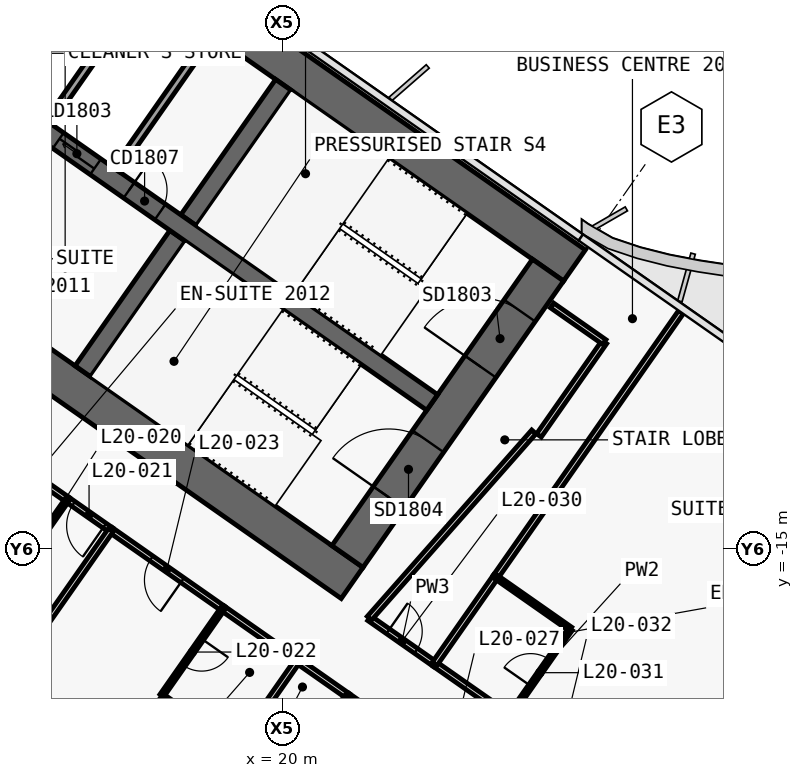
"""IFC4 building model, lengths in metres.
Left out: names, types, materials, properties, quantities, classifications, styles, units other than length and angle.
Written with IfcOpenShell. Run it as: python <this file> out.ifc"""

import sys

from ifc_helpers import new_model, si_unit, direction, frame, frame_2d, origin, place, context, subcontext, project, spatial, polyline, rectangle, outline, extrude, element, fill, save


model = new_model("IFC4")
c1 = context("Model", 3, precision=1e-05, world=origin(), true_north=direction((0.0, 1.0)))
c2 = subcontext(c1, "Body", "Model", "MODEL_VIEW")
j1 = project(units=[si_unit("LENGTHUNIT", "METRE"), si_unit("PLANEANGLEUNIT", "RADIAN")], contexts=[c1])
p1 = place(None, origin())
s1 = spatial("IfcSite", under=j1, at=p1, CompositionType="ELEMENT")
p2 = place(p1, origin())
s2 = spatial("IfcBuilding", under=s1, at=p2, CompositionType="ELEMENT")
p3 = place(p2, frame((0.0, 0.0, 97.7)))
s3 = spatial("IfcBuildingStorey", under=s2, at=p3, CompositionType="ELEMENT", Elevation=97.7)
p4 = place(p3, frame((-0.037, 11.867, 0.0), z_axis=(0.0, 0.0, 1.0), x_axis=(0.819155306259, -0.573571777746, 0.0)))
e1 = element("IfcWall", 1, at=p4, inside=s3, PredefinedType="SHEAR", context=c2, shape_type="SweptSolid", body=[
    extrude(outline(polyline([(33.837, 0.5), (0.0, 0.5), (0.7, -0.5), (33.837, -0.5), (33.837, 0.5)])), origin(), (0.0, 0.0, 1.0), 3.6),
])
p5 = place(p3, frame((-0.037, -0.585, 0.0), z_axis=(0.0, 0.0, 1.0), x_axis=(0.819157152511, -0.573569140985, 0.0)))
e2 = element("IfcWall", 2, at=p5, inside=s3, PredefinedType="SHEAR", context=c2, shape_type="SweptSolid", body=[
    extrude(outline(polyline([(26.695, 0.5), (0.0, 0.5), (0.7, -0.5), (26.695, -0.5), (26.695, 0.5)])), origin(), (0.0, 0.0, 1.0), 3.6),
])
p6 = place(p5, frame((1.245, 0.0, 0.0)))
e3 = element("IfcOpeningElement", 3, at=p6, cuts=e2, PredefinedType="OPENING", context=c2, shape_type="SweptSolid", body=[
    extrude(rectangle(XDim=1.5, YDim=2.1, at=frame_2d((0.75, 1.05))), frame((0.0, 0.51, 0.0), z_axis=(0.0, -1.0, 0.0), x_axis=(1.0, 0.0, 0.0)), (0.0, 0.0, 1.0), 1.02),
])
p7 = place(p5, frame((12.445, 0.0, 0.0)))
e4 = element("IfcOpeningElement", 4, at=p7, cuts=e2, PredefinedType="OPENING", context=c2, shape_type="SweptSolid", body=[
    extrude(rectangle(XDim=1.5, YDim=2.1, at=frame_2d((0.75, 1.05))), frame((0.0, 0.51, 0.0), z_axis=(0.0, -1.0, 0.0), x_axis=(1.0, 0.0, 0.0)), (0.0, 0.0, 1.0), 1.02),
])
p8 = place(p3, frame((21.708, -15.2, 0.0), z_axis=(0.0, 0.0, 1.0), x_axis=(0.573576324356, 0.819152122709, 0.0)))
e5 = element("IfcWall", 5, at=p8, inside=s3, PredefinedType="SHEAR", context=c2, shape_type="SweptSolid", body=[
    extrude(outline(polyline([(9.2, 0.5), (0.0, 0.5), (0.0, -0.5), (9.2, -0.5), (9.2, 0.5)])), origin(), (0.0, 0.0, 1.0), 3.6),
])
p9 = place(p8, frame((6.1, 0.0, 0.0)))
e6 = element("IfcOpeningElement", 6, at=p9, cuts=e5, PredefinedType="OPENING", context=c2, shape_type="SweptSolid", body=[
    extrude(rectangle(XDim=1.8, YDim=2.1, at=frame_2d((0.9, 1.05))), frame((0.0, 0.51, 0.0), z_axis=(0.0, -1.0, 0.0), x_axis=(1.0, 0.0, 0.0)), (0.0, 0.0, 1.0), 1.02),
])
p10 = place(p8, frame((1.9, 0.0, 0.0)))
e7 = element("IfcOpeningElement", 7, at=p10, cuts=e5, PredefinedType="OPENING", context=c2, shape_type="SweptSolid", body=[
    extrude(rectangle(XDim=1.8, YDim=2.1, at=frame_2d((0.9, 1.05))), frame((0.0, 0.51, 0.0), z_axis=(0.0, -1.0, 0.0), x_axis=(1.0, 0.0, 0.0)), (0.0, 0.0, 1.0), 1.02),
])
p11 = place(p3, frame((14.745, -10.324, 0.0), z_axis=(0.0, 0.0, 1.0), x_axis=(0.57356780395, 0.819158088694, 0.0)))
e8 = element("IfcWall", 8, at=p11, inside=s3, PredefinedType="SHEAR", context=c2, shape_type="SweptSolid", body=[
    extrude(outline(polyline([(0.0, 0.25), (0.0, -0.25), (4.35, -0.25), (4.35, 0.25), (0.0, 0.25)])), origin(), (0.0, 0.0, 1.0), 3.6),
])
p12 = place(p3, frame((17.527, -6.352, 0.0), z_axis=(0.0, 0.0, 1.0), x_axis=(0.573530143085, 0.819184457233, 0.0)))
e9 = element("IfcWall", 9, at=p12, inside=s3, PredefinedType="SHEAR", context=c2, shape_type="SweptSolid", body=[
    extrude(outline(polyline([(4.35, -0.25), (4.35, 0.25), (0.0, 0.25), (0.0, -0.25), (4.35, -0.25)])), origin(), (0.0, 0.0, 1.0), 3.6),
])
p13 = place(p3, frame((2.638, 3.768, 0.0), z_axis=(0.0, 0.0, 1.0), x_axis=(0.819148977158, -0.573580816643, 0.0)))
e10 = element("IfcWall", 10, at=p13, inside=s3, PredefinedType="SHEAR", context=c2, shape_type="SweptSolid", body=[
    extrude(outline(polyline([(0.0, 0.25), (0.0, -0.25), (26.0, -0.25), (26.0, 0.25), (0.0, 0.25)])), origin(), (0.0, 0.0, 1.0), 3.6),
])
p14 = place(p13, frame((9.637, 0.0, 0.0)))
e11 = element("IfcOpeningElement", 11, at=p14, cuts=e10, PredefinedType="OPENING", context=c2, shape_type="SweptSolid", body=[
    extrude(rectangle(XDim=1.2, YDim=2.1, at=frame_2d((0.6, 1.05))), frame((0.0, 0.26, 0.0), z_axis=(0.0, -1.0, 0.0), x_axis=(1.0, 0.0, 0.0)), (0.0, 0.0, 1.0), 0.52),
])
p15 = place(p13, frame((11.812, 0.0, 0.0)))
e12 = element("IfcOpeningElement", 12, at=p15, cuts=e10, PredefinedType="OPENING", context=c2, shape_type="SweptSolid", body=[
    extrude(rectangle(XDim=1.2, YDim=2.1, at=frame_2d((0.6, 1.05))), frame((0.0, 0.26, 0.0), z_axis=(0.0, -1.0, 0.0), x_axis=(1.0, 0.0, 0.0)), (0.0, 0.0, 1.0), 0.52),
])
p16 = place(p13, frame((13.988, 0.0, 0.0)))
e13 = element("IfcOpeningElement", 13, at=p16, cuts=e10, PredefinedType="OPENING", context=c2, shape_type="SweptSolid", body=[
    extrude(rectangle(XDim=1.2, YDim=2.1, at=frame_2d((0.6, 1.05))), frame((0.0, 0.26, 0.0), z_axis=(0.0, -1.0, 0.0), x_axis=(1.0, 0.0, 0.0)), (0.0, 0.0, 1.0), 0.52),
])
p17 = place(p13, frame((16.262, 0.0, 0.0)))
e14 = element("IfcOpeningElement", 14, at=p17, cuts=e10, PredefinedType="OPENING", context=c2, shape_type="SweptSolid", body=[
    extrude(rectangle(XDim=1.0, YDim=2.1, at=frame_2d((0.5, 1.05))), frame((0.0, 0.26, 0.0), z_axis=(0.0, -1.0, 0.0), x_axis=(1.0, 0.0, 0.0)), (0.0, 0.0, 1.0), 0.52),
])
p18 = place(p3, frame((12.059, -2.523, 0.0), z_axis=(0.0, 0.0, 1.0), x_axis=(0.573594173421, 0.819139624372, 0.0)))
e15 = element("IfcWall", 15, at=p18, inside=s3, PredefinedType="SOLIDWALL", context=c2, shape_type="SweptSolid", body=[
    extrude(rectangle(XDim=4.35, YDim=0.2, at=frame_2d((2.175, 0.0))), origin(), (0.0, 0.0, 1.0), 3.6),
])
p19 = place(p3, frame((13.84, -3.771, 0.0), z_axis=(0.0, 0.0, 1.0), x_axis=(0.57356780395, 0.819158088694, 0.0)))
e16 = element("IfcWall", 16, at=p19, inside=s3, PredefinedType="SOLIDWALL", context=c2, shape_type="SweptSolid", body=[
    extrude(rectangle(XDim=4.35, YDim=0.2, at=frame_2d((2.175, 0.0))), origin(), (0.0, 0.0, 1.0), 3.6),
])
p20 = place(p3, frame((15.622, -5.018, 0.0), z_axis=(0.0, 0.0, 1.0), x_axis=(0.573594173421, 0.819139624372, 0.0)))
e17 = element("IfcWall", 17, at=p20, inside=s3, PredefinedType="SOLIDWALL", context=c2, shape_type="SweptSolid", body=[
    extrude(rectangle(XDim=4.35, YDim=0.2, at=frame_2d((2.175, 0.0))), origin(), (0.0, 0.0, 1.0), 3.6),
])
p21 = place(p3, frame((22.284, -16.824, 0.0), z_axis=(0.0, 0.0, 1.0), x_axis=(0.819160859995, -0.573563846013, 0.0)))
e18 = element("IfcWall", 18, at=p21, inside=s3, PredefinedType="PARTITIONING", context=c2, shape_type="SweptSolid", body=[
    extrude(rectangle(XDim=2.098, YDim=0.15, at=frame_2d((1.049, 0.0))), origin(), (0.0, 0.0, 1.0), 3.32),
])
p22 = place(p21, frame((0.599, 0.0, 0.0)))
e19 = element("IfcOpeningElement", 19, at=p22, cuts=e18, PredefinedType="OPENING", context=c2, shape_type="SweptSolid", body=[
    extrude(rectangle(XDim=0.9, YDim=2.1, at=frame_2d((0.45, 1.05))), frame((0.0, 0.085, 0.0), z_axis=(0.0, -1.0, 0.0), x_axis=(1.0, 0.0, 0.0)), (0.0, 0.0, 1.0), 0.17),
])
p23 = place(p3, frame((23.999, -18.025, 0.0), z_axis=(0.0, 0.0, 1.0), x_axis=(0.819146032251, -0.573585022335, 0.0)))
e20 = element("IfcWall", 20, at=p23, inside=s3, PredefinedType="PARTITIONING", context=c2, shape_type="SweptSolid", body=[
    extrude(rectangle(XDim=2.404, YDim=0.15, at=frame_2d((1.202, 0.0))), origin(), (0.0, 0.0, 1.0), 3.32),
])
p24 = place(p3, frame((15.483, -14.504, 0.0), z_axis=(0.0, 0.0, 1.0), x_axis=(-0.819199220913, 0.573509055252, 0.0)))
e21 = element("IfcWall", 21, at=p24, inside=s3, PredefinedType="PARTITIONING", context=c2, shape_type="SweptSolid", body=[
    extrude(rectangle(XDim=1.403, YDim=0.15, at=frame_2d((0.702, 0.0))), origin(), (0.0, 0.0, 1.0), 3.32),
])
p25 = place(p24, frame((0.202, 0.0, 0.0)))
e22 = element("IfcOpeningElement", 22, at=p25, cuts=e21, PredefinedType="OPENING", context=c2, shape_type="SweptSolid", body=[
    extrude(rectangle(XDim=1.0, YDim=2.1, at=frame_2d((0.5, 1.05))), frame((0.0, 0.085, 0.0), z_axis=(0.0, -1.0, 0.0), x_axis=(1.0, 0.0, 0.0)), (0.0, 0.0, 1.0), 0.17),
])
p26 = place(p3, frame((14.336, -13.701, 0.0), z_axis=(0.0, 0.0, 1.0), x_axis=(-0.819138938282, 0.573595153214, 0.0)))
e23 = element("IfcWall", 23, at=p26, inside=s3, PredefinedType="PARTITIONING", context=c2, shape_type="SweptSolid", body=[
    extrude(rectangle(XDim=1.604, YDim=0.15, at=frame_2d((0.802, 0.0))), origin(), (0.0, 0.0, 1.0), 2.6),
])
p27 = place(p3, frame((18.431, -16.568, 0.0), z_axis=(0.0, 0.0, 1.0), x_axis=(-0.819145961204, 0.573585123798, 0.0)))
e24 = element("IfcWall", 24, at=p27, inside=s3, PredefinedType="PARTITIONING", context=c2, shape_type="SweptSolid", body=[
    extrude(rectangle(XDim=3.603, YDim=0.15, at=frame_2d((1.802, 0.0))), origin(), (0.0, 0.0, 1.0), 3.32),
])
p28 = place(p27, frame((1.301, 0.0, 0.0)))
e25 = element("IfcOpeningElement", 25, at=p28, cuts=e24, PredefinedType="OPENING", context=c2, shape_type="SweptSolid", body=[
    extrude(rectangle(XDim=1.0, YDim=2.1, at=frame_2d((0.5, 1.05))), frame((0.0, 0.085, 0.0), z_axis=(0.0, -1.0, 0.0), x_axis=(1.0, 0.0, 0.0)), (0.0, 0.0, 1.0), 0.17),
])
p29 = place(p3, frame((20.398, -17.945, 0.0), z_axis=(0.0, 0.0, 1.0), x_axis=(-0.819146032251, 0.573585022335, 0.0)))
e26 = element("IfcWall", 26, at=p29, inside=s3, PredefinedType="PARTITIONING", context=c2, shape_type="SweptSolid", body=[
    extrude(rectangle(XDim=2.404, YDim=0.15, at=frame_2d((1.202, 0.0))), origin(), (0.0, 0.0, 1.0), 2.6),
])
p30 = place(p3, frame((22.855, -19.666, 0.0), z_axis=(0.0, 0.0, 1.0), x_axis=(-0.819060210533, 0.573707566205, 0.0)))
e27 = element("IfcWall", 27, at=p30, inside=s3, PredefinedType="PARTITIONING", context=c2, shape_type="SweptSolid", body=[
    extrude(rectangle(XDim=1.403, YDim=0.15, at=frame_2d((0.702, 0.0))), origin(), (0.0, 0.0, 1.0), 3.32),
])
p31 = place(p30, frame((0.202, 0.0, 0.0)))
e28 = element("IfcOpeningElement", 28, at=p31, cuts=e27, PredefinedType="OPENING", context=c2, shape_type="SweptSolid", body=[
    extrude(rectangle(XDim=1.0, YDim=2.1, at=frame_2d((0.5, 1.05))), frame((0.0, 0.085, 0.0), z_axis=(0.0, -1.0, 0.0), x_axis=(1.0, 0.0, 0.0)), (0.0, 0.0, 1.0), 0.17),
])
p32 = place(p3, frame((21.709, -18.863, 0.0), z_axis=(0.0, 0.0, 1.0), x_axis=(-0.819189013667, 0.573523634986, 0.0)))
e29 = element("IfcWall", 29, at=p32, inside=s3, PredefinedType="PARTITIONING", context=c2, shape_type="SweptSolid", body=[
    extrude(rectangle(XDim=1.604, YDim=0.15, at=frame_2d((0.802, 0.0))), origin(), (0.0, 0.0, 1.0), 2.6),
])
p33 = place(p3, frame((30.482, -8.77, 0.0), z_axis=(0.0, 0.0, 1.0), x_axis=(-0.573576058406, -0.819152308929, 0.0)))
e30 = element("IfcWall", 30, at=p33, inside=s3, PredefinedType="PARTITIONING", context=c2, shape_type="SweptSolid", body=[
    extrude(rectangle(XDim=8.501, YDim=0.15, at=frame_2d((4.25, 0.0))), origin(), (0.0, 0.0, 1.0), 2.6),
])
p34 = place(p3, frame((25.608, -15.731, 0.0), z_axis=(0.0, 0.0, 1.0), x_axis=(-0.573596837309, -0.819137759006, 0.0)))
e31 = element("IfcWall", 31, at=p34, inside=s3, PredefinedType="PARTITIONING", context=c2, shape_type="SweptSolid", body=[
    extrude(rectangle(XDim=2.802, YDim=0.15, at=frame_2d((1.401, 0.0))), origin(), (0.0, 0.0, 1.0), 2.6),
])
p35 = place(p3, frame((22.285, -16.825, 0.0), z_axis=(0.0, 0.0, 1.0), x_axis=(0.661551268245, 0.749899939647, 0.0)))
e32 = element("IfcWall", 32, at=p35, inside=s3, PredefinedType="PARTITIONING", context=c2, shape_type="SweptSolid", body=[
    extrude(rectangle(XDim=6.541, YDim=0.15, at=frame_2d((3.271, 0.0))), origin(), (0.0, 0.0, 1.0), 2.6),
])
p36 = place(p3, frame((26.746, -12.014, 0.0), z_axis=(0.0, 0.0, 1.0), x_axis=(0.573560650686, 0.819163097304, 0.0)))
e33 = element("IfcWall", 33, at=p36, inside=s3, PredefinedType="PARTITIONING", context=c2, shape_type="SweptSolid", body=[
    extrude(rectangle(XDim=3.0, YDim=0.15, at=frame_2d((1.5, 0.0))), origin(), (0.0, 0.0, 1.0), 3.32),
])
p37 = place(p3, frame((28.467, -9.556, 0.0), z_axis=(0.0, 0.0, 1.0), x_axis=(-0.819109000826, 0.573637903879, 0.0)))
e34 = element("IfcWall", 34, at=p37, inside=s3, PredefinedType="PARTITIONING", context=c2, shape_type="SweptSolid", body=[
    extrude(rectangle(XDim=1.68, YDim=0.15, at=frame_2d((0.84, 0.0))), origin(), (0.0, 0.0, 1.0), 3.32),
])
p38 = place(p3, frame((25.968, -19.404, 0.0), z_axis=(0.0, 0.0, 1.0), x_axis=(0.573591086599, 0.819141785879, 0.0)))
e35 = element("IfcWall", 35, at=p38, inside=s3, PredefinedType="PARTITIONING", context=c2, shape_type="SweptSolid", body=[
    extrude(rectangle(XDim=2.8, YDim=0.12, at=frame_2d((1.4, 0.0))), origin(), (0.0, 0.0, 1.0), 2.6),
])
p39 = place(p38, frame((0.975, 0.0, 0.0)))
e36 = element("IfcOpeningElement", 36, at=p39, cuts=e35, PredefinedType="OPENING", context=c2, shape_type="SweptSolid", body=[
    extrude(rectangle(XDim=0.85, YDim=2.05, at=frame_2d((0.425, 1.025))), frame((0.0, 0.07, 0.0), z_axis=(0.0, -1.0, 0.0), x_axis=(1.0, 0.0, 0.0)), (0.0, 0.0, 1.0), 0.14),
])
p40 = place(p3, frame((27.573, -17.109, 0.0), z_axis=(0.0, 0.0, 1.0), x_axis=(-0.819107643868, 0.573639841501, 0.0)))
e37 = element("IfcWall", 37, at=p40, inside=s3, PredefinedType="PARTITIONING", context=c2, shape_type="SweptSolid", body=[
    extrude(rectangle(XDim=2.4, YDim=0.12, at=frame_2d((1.2, 0.0))), origin(), (0.0, 0.0, 1.0), 3.32),
])
p41 = place(p3, frame((37.855, -13.932, 0.0), z_axis=(0.0, 0.0, 1.0), x_axis=(-0.573571089604, -0.819155788095, 0.0)))
e38 = element("IfcWall", 38, at=p41, inside=s3, PredefinedType="PARTITIONING", context=c2, shape_type="SweptSolid", body=[
    extrude(rectangle(XDim=11.3, YDim=0.15, at=frame_2d((5.65, 0.0))), origin(), (0.0, 0.0, 1.0), 2.5),
])
p42 = place(p3, frame((12.844, -15.83, 0.0), z_axis=(0.0, 0.0, 1.0), x_axis=(0.573582085028, 0.819148089014, 0.0)))
e39 = element("IfcWall", 39, at=p42, inside=s3, PredefinedType="PARTITIONING", context=c2, shape_type="SweptSolid", body=[
    extrude(rectangle(XDim=2.6, YDim=0.12, at=frame_2d((1.3, 0.0))), origin(), (0.0, 0.0, 1.0), 3.32),
])
p43 = place(p42, frame((0.875, 0.0, 0.0)))
e40 = element("IfcOpeningElement", 40, at=p43, cuts=e39, PredefinedType="OPENING", context=c2, shape_type="SweptSolid", body=[
    extrude(rectangle(XDim=0.85, YDim=2.05, at=frame_2d((0.425, 1.025))), frame((0.0, 0.07, 0.0), z_axis=(0.0, -1.0, 0.0), x_axis=(1.0, 0.0, 0.0)), (0.0, 0.0, 1.0), 0.14),
])
p44 = place(p3, frame((15.481, -14.503, 0.0), z_axis=(0.0, 0.0, 1.0), x_axis=(-0.573572324301, -0.819154923562, 0.0)))
e41 = element("IfcWall", 41, at=p44, inside=s3, PredefinedType="PARTITIONING", context=c2, shape_type="SweptSolid", body=[
    extrude(rectangle(XDim=7.3, YDim=0.15, at=frame_2d((3.65, 0.0))), origin(), (0.0, 0.0, 1.0), 2.5),
])
p45 = place(p3, frame((18.43, -16.567, 0.0), z_axis=(0.0, 0.0, 1.0), x_axis=(-0.573608623498, -0.819129505664, 0.0)))
e42 = element("IfcWall", 42, at=p45, inside=s3, PredefinedType="PARTITIONING", context=c2, shape_type="SweptSolid", body=[
    extrude(rectangle(XDim=2.8, YDim=0.12, at=frame_2d((1.4, 0.0))), origin(), (0.0, 0.0, 1.0), 3.32),
])
p46 = place(p45, frame((0.975, 0.0, 0.0)))
e43 = element("IfcOpeningElement", 43, at=p46, cuts=e42, PredefinedType="OPENING", context=c2, shape_type="SweptSolid", body=[
    extrude(rectangle(XDim=0.85, YDim=2.05, at=frame_2d((0.425, 1.025))), frame((0.0, 0.07, 0.0), z_axis=(0.0, -1.0, 0.0), x_axis=(1.0, 0.0, 0.0)), (0.0, 0.0, 1.0), 0.14),
])
p47 = place(p3, frame((16.824, -18.862, 0.0), z_axis=(0.0, 0.0, 1.0), x_axis=(0.819141114317, -0.573592045652, 0.0)))
e44 = element("IfcWall", 44, at=p47, inside=s3, PredefinedType="PARTITIONING", context=c2, shape_type="SweptSolid", body=[
    extrude(rectangle(XDim=2.4, YDim=0.12, at=frame_2d((1.2, 0.0))), origin(), (0.0, 0.0, 1.0), 2.6),
])
p48 = place(p3, frame((20.396, -17.944, 0.0), z_axis=(0.0, 0.0, 1.0), x_axis=(-0.573651240222, -0.819099660964, 0.0)))
e45 = element("IfcWall", 45, at=p48, inside=s3, PredefinedType="PARTITIONING", context=c2, shape_type="SweptSolid", body=[
    extrude(rectangle(XDim=2.602, YDim=0.15, at=frame_2d((1.301, 0.0))), origin(), (0.0, 0.0, 1.0), 2.6),
])
p49 = place(p3, frame((20.217, -20.992, 0.0), z_axis=(0.0, 0.0, 1.0), x_axis=(0.573537965655, 0.819178980414, 0.0)))
e46 = element("IfcWall", 46, at=p49, inside=s3, PredefinedType="PARTITIONING", context=c2, shape_type="SweptSolid", body=[
    extrude(rectangle(XDim=2.6, YDim=0.12, at=frame_2d((1.3, 0.0))), origin(), (0.0, 0.0, 1.0), 3.32),
])
p50 = place(p49, frame((0.875, 0.0, 0.0)))
e47 = element("IfcOpeningElement", 47, at=p50, cuts=e46, PredefinedType="OPENING", context=c2, shape_type="SweptSolid", body=[
    extrude(rectangle(XDim=0.85, YDim=2.05, at=frame_2d((0.425, 1.025))), frame((0.0, 0.07, 0.0), z_axis=(0.0, -1.0, 0.0), x_axis=(1.0, 0.0, 0.0)), (0.0, 0.0, 1.0), 0.14),
])
p51 = place(p16, origin())
e48 = element("IfcDoor", 48, at=p51, inside=s3, OperationType="SLIDING_TO_LEFT", PredefinedType="DOOR", context=c2, shape_type="SweptSolid", body=[
    extrude(rectangle(XDim=1.2, YDim=2.1, at=frame_2d((0.6, 1.05))), frame((0.0, 0.025, 0.0), z_axis=(0.0, -1.0, 0.0), x_axis=(1.0, 0.0, 0.0)), (0.0, 0.0, 1.0), 0.05),
])
fill(e13, e48)
p52 = place(p17, origin())
e49 = element("IfcDoor", 49, at=p52, inside=s3, OperationType="SINGLE_SWING_RIGHT", PredefinedType="DOOR", context=c2, shape_type="SweptSolid", body=[
    extrude(rectangle(XDim=1.0, YDim=2.1, at=frame_2d((0.5, 1.05))), frame((0.0, 0.025, 0.0), z_axis=(0.0, -1.0, 0.0), x_axis=(1.0, 0.0, 0.0)), (0.0, 0.0, 1.0), 0.05),
])
fill(e14, e49)
p53 = place(p9, origin())
e50 = element("IfcDoor", 50, at=p53, inside=s3, OperationType="DOUBLE_DOOR_SINGLE_SWING", PredefinedType="DOOR", context=c2, shape_type="SweptSolid", body=[
    extrude(rectangle(XDim=1.8, YDim=2.1, at=frame_2d((0.9, 1.05))), frame((0.0, 0.025, 0.0), z_axis=(0.0, -1.0, 0.0), x_axis=(1.0, 0.0, 0.0)), (0.0, 0.0, 1.0), 0.05),
])
fill(e6, e50)
p54 = place(p10, origin())
e51 = element("IfcDoor", 51, at=p54, inside=s3, OperationType="DOUBLE_DOOR_SINGLE_SWING", PredefinedType="DOOR", context=c2, shape_type="SweptSolid", body=[
    extrude(rectangle(XDim=1.8, YDim=2.1, at=frame_2d((0.9, 1.05))), frame((0.0, 0.025, 0.0), z_axis=(0.0, -1.0, 0.0), x_axis=(1.0, 0.0, 0.0)), (0.0, 0.0, 1.0), 0.05),
])
fill(e7, e51)
p55 = place(p25, origin())
e52 = element("IfcDoor", 52, at=p55, inside=s3, OperationType="SINGLE_SWING_RIGHT", PredefinedType="DOOR", context=c2, shape_type="SweptSolid", body=[
    extrude(rectangle(XDim=1.0, YDim=2.1, at=frame_2d((0.5, 1.05))), frame((0.0, 0.025, 0.0), z_axis=(0.0, -1.0, 0.0), x_axis=(1.0, 0.0, 0.0)), (0.0, 0.0, 1.0), 0.05),
])
fill(e22, e52)
p56 = place(p46, origin())
e53 = element("IfcDoor", 53, at=p56, inside=s3, OperationType="SINGLE_SWING_RIGHT", PredefinedType="DOOR", context=c2, shape_type="SweptSolid", body=[
    extrude(rectangle(XDim=0.85, YDim=2.05, at=frame_2d((0.425, 1.025))), frame((0.0, 0.025, 0.0), z_axis=(0.0, -1.0, 0.0), x_axis=(1.0, 0.0, 0.0)), (0.0, 0.0, 1.0), 0.05),
])
fill(e43, e53)
p57 = place(p28, origin())
e54 = element("IfcDoor", 54, at=p57, inside=s3, OperationType="SINGLE_SWING_LEFT", PredefinedType="DOOR", context=c2, shape_type="SweptSolid", body=[
    extrude(rectangle(XDim=1.0, YDim=2.1, at=frame_2d((0.5, 1.05))), frame((0.0, 0.025, 0.0), z_axis=(0.0, -1.0, 0.0), x_axis=(1.0, 0.0, 0.0)), (0.0, 0.0, 1.0), 0.05),
])
fill(e25, e54)
p58 = place(p22, origin())
e55 = element("IfcDoor", 55, at=p58, inside=s3, OperationType="SINGLE_SWING_RIGHT", PredefinedType="DOOR", context=c2, shape_type="SweptSolid", body=[
    extrude(rectangle(XDim=0.9, YDim=2.1, at=frame_2d((0.45, 1.05))), frame((0.0, 0.025, 0.0), z_axis=(0.0, -1.0, 0.0), x_axis=(1.0, 0.0, 0.0)), (0.0, 0.0, 1.0), 0.05),
])
fill(e19, e55)
p59 = place(p39, origin())
e56 = element("IfcDoor", 56, at=p59, inside=s3, OperationType="SINGLE_SWING_LEFT", PredefinedType="DOOR", context=c2, shape_type="SweptSolid", body=[
    extrude(rectangle(XDim=0.85, YDim=2.05, at=frame_2d((0.425, 1.025))), frame((0.0, 0.025, 0.0), z_axis=(0.0, -1.0, 0.0), x_axis=(1.0, 0.0, 0.0)), (0.0, 0.0, 1.0), 0.05),
])
fill(e36, e56)
save(model, sys.argv[1])
